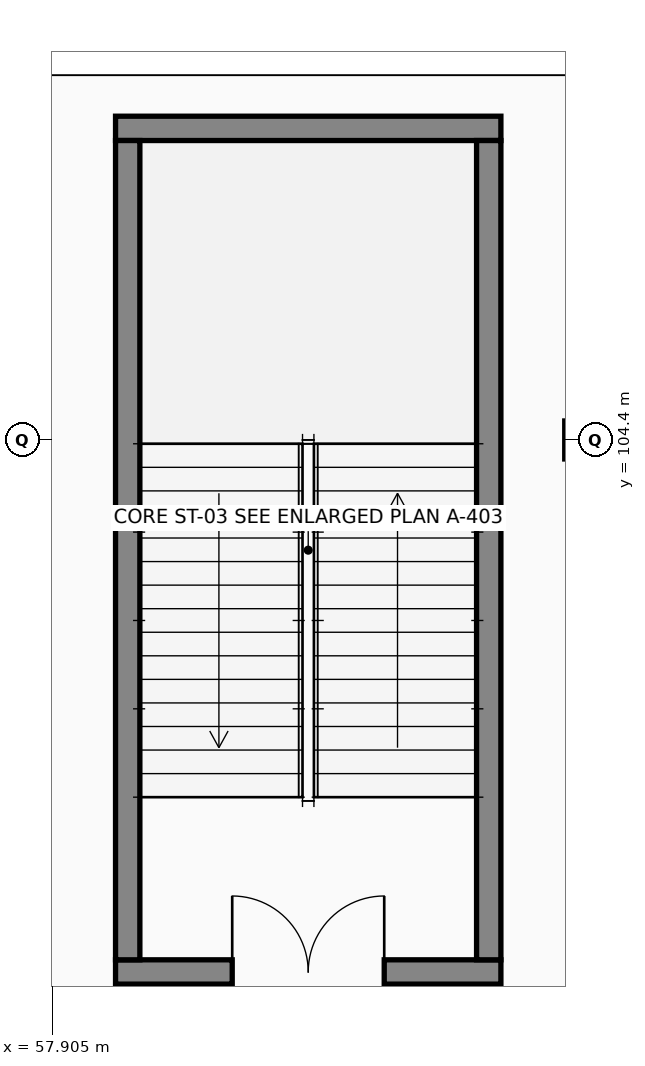
"""IFC4 building model, lengths in metres.
Left out: names, types, materials, properties, quantities, classifications, styles, units other than length and angle.
Written with IfcOpenShell. Run it as: python <this file> out.ifc"""

import sys

from ifc_helpers import new_model, si_unit, direction, frame, frame_2d, origin, place, context, subcontext, project, spatial, rectangle, extrude, element, fill, save


model = new_model("IFC4")
c1 = context("Model", 3, precision=1e-05, world=origin(), true_north=direction((0.0, 1.0)))
c2 = subcontext(c1, "Body", "Model", "MODEL_VIEW")
j1 = project(units=[si_unit("LENGTHUNIT", "METRE"), si_unit("PLANEANGLEUNIT", "RADIAN")], contexts=[c1])
p1 = place(None, origin())
s1 = spatial("IfcSite", under=j1, at=p1, CompositionType="ELEMENT")
p2 = place(p1, origin())
s2 = spatial("IfcBuilding", under=s1, at=p2, CompositionType="ELEMENT")
p3 = place(p2, frame((0.0, 0.0, -4.8)))
s3 = spatial("IfcBuildingStorey", under=s2, at=p3, CompositionType="ELEMENT", Elevation=-4.8)
p4 = place(p3, frame((58.74, 97.4, 0.0), z_axis=(0.0, 0.0, 1.0), x_axis=(1.0, 0.0, 0.0)))
e1 = element("IfcWall", 1, at=p4, inside=s3, PredefinedType="SHEAR", context=c2, shape_type="SweptSolid", body=[
    extrude(rectangle(XDim=5.07, YDim=0.32, at=frame_2d((2.535, 0.0))), origin(), (0.0, 0.0, 1.0), 4.55),
])
p5 = place(p4, frame((1.535, 0.0, 0.0)))
e2 = element("IfcOpeningElement", 2, at=p5, cuts=e1, PredefinedType="OPENING", context=c2, shape_type="SweptSolid", body=[
    extrude(rectangle(XDim=2.0, YDim=2.15, at=frame_2d((1.0, 1.075))), frame((0.0, 0.17, 0.0), z_axis=(0.0, -1.0, 0.0), x_axis=(1.0, 0.0, 0.0)), (0.0, 0.0, 1.0), 0.34),
])
p6 = place(p3, frame((58.74, 108.5, 0.0), z_axis=(0.0, 0.0, 1.0), x_axis=(1.0, 0.0, 0.0)))
e3 = element("IfcWall", 3, at=p6, inside=s3, PredefinedType="SHEAR", context=c2, shape_type="SweptSolid", body=[
    extrude(rectangle(XDim=5.07, YDim=0.32, at=frame_2d((2.535, 0.0))), origin(), (0.0, 0.0, 1.0), 4.55),
])
for number, where, z_axis, x_axis in (
    (4, (58.9, 97.56, 0.0), (0.0, 0.0, 1.0), (0.0, 1.0, 0.0)),
    (5, (63.65, 97.56, 0.0), (0.0, 0.0, 1.0), (0.0, 1.0, 0.0)),
):
    element("IfcWall", number, at=place(p3, frame(where, z_axis=z_axis, x_axis=x_axis)), inside=s3, PredefinedType="SHEAR", context=c2, shape_type="SweptSolid", body=[
        extrude(rectangle(XDim=10.78, YDim=0.32, at=frame_2d((5.39, 0.0))), origin(), (0.0, 0.0, 1.0), 4.55),
    ])
p7 = place(p5, origin())
e6 = element("IfcDoor", 6, at=p7, inside=s3, OperationType="DOUBLE_DOOR_SINGLE_SWING", PredefinedType="DOOR", context=c2, shape_type="SweptSolid", body=[
    extrude(rectangle(XDim=2.0, YDim=2.15, at=frame_2d((1.0, 1.075))), frame((0.0, 0.025, 0.0), z_axis=(0.0, -1.0, 0.0), x_axis=(1.0, 0.0, 0.0)), (0.0, 0.0, 1.0), 0.05),
])
fill(e2, e6)
save(model, sys.argv[1])
